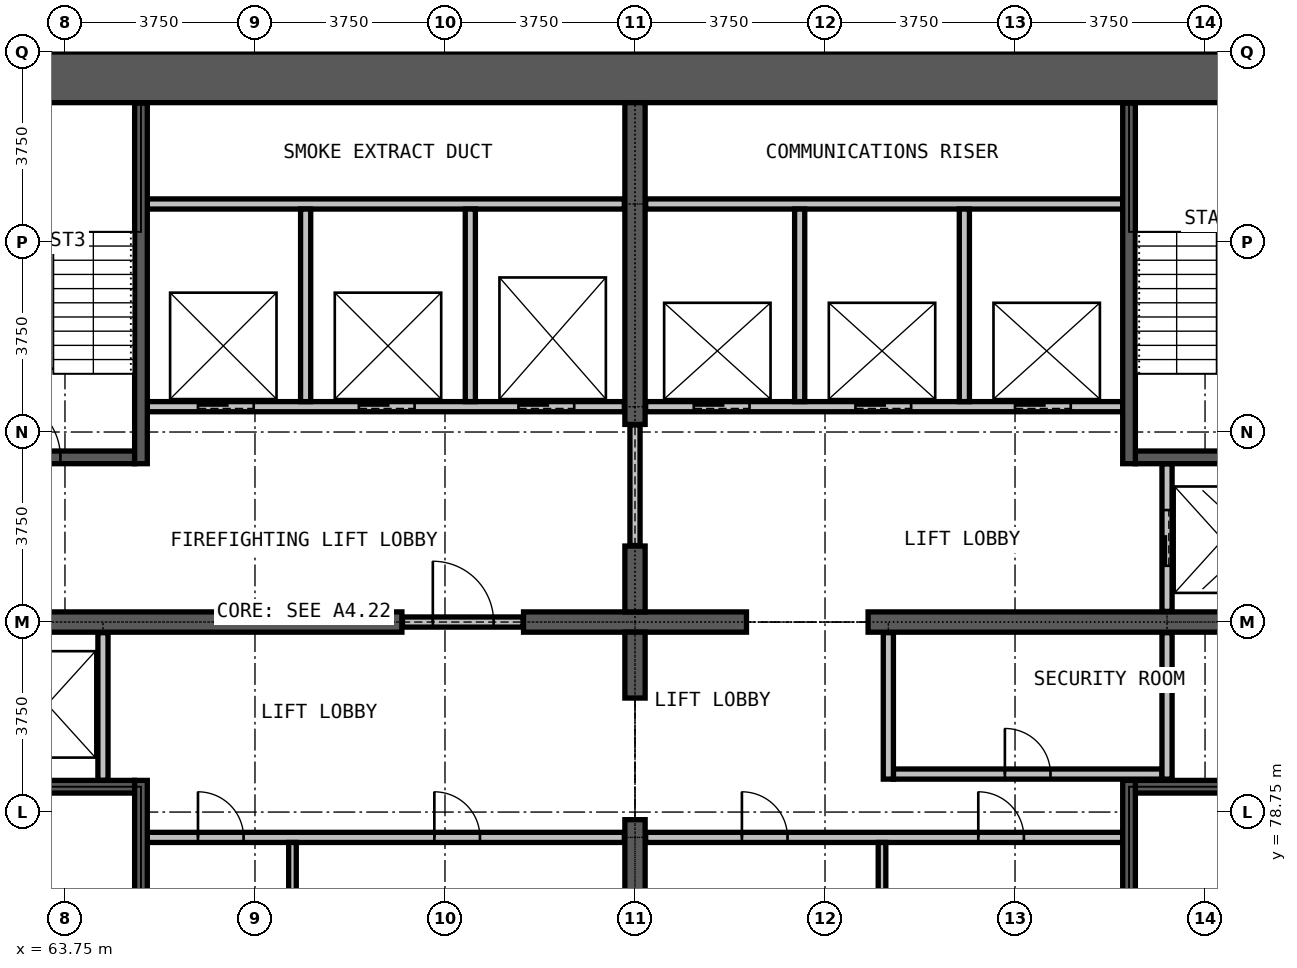
"""IFC4 building model, lengths in metres.
Left out: names, types, materials, properties, quantities, classifications, styles, units other than length and angle.
Written with IfcOpenShell. Run it as: python <this file> out.ifc"""

import sys

from ifc_helpers import new_model, si_unit, direction, frame, frame_2d, origin, place, context, subcontext, project, spatial, rectangle, extrude, element, fill, save


model = new_model("IFC4")
c1 = context("Model", 3, precision=1e-05, world=origin(), true_north=direction((0.0, 1.0)))
c2 = subcontext(c1, "Body", "Model", "MODEL_VIEW")
j1 = project(units=[si_unit("LENGTHUNIT", "METRE"), si_unit("PLANEANGLEUNIT", "RADIAN")], contexts=[c1])
p1 = place(None, origin())
s1 = spatial("IfcSite", under=j1, at=p1, CompositionType="ELEMENT")
p2 = place(p1, origin())
s2 = spatial("IfcBuilding", under=s1, at=p2, CompositionType="ELEMENT")
p3 = place(p2, frame((0.0, 0.0, 235.5)))
s3 = spatial("IfcBuildingStorey", under=s2, at=p3, CompositionType="ELEMENT", Elevation=235.5)
p4 = place(p3, frame((90.0, 93.25, 0.0), z_axis=(0.0, 0.0, 1.0), x_axis=(-1.0, 0.0, 0.0)))
e1 = element("IfcWall", 1, at=p4, inside=s3, PredefinedType="SHEAR", context=c2, shape_type="SweptSolid", body=[
    extrude(rectangle(XDim=30.0, YDim=1.0, at=frame_2d((15.0, 0.0))), origin(), (0.0, 0.0, 1.0), 3.6),
])
p5 = place(p3, frame((61.0, 82.5, 0.0), z_axis=(0.0, 0.0, 1.0), x_axis=(1.0, 0.0, 0.0)))
e2 = element("IfcWall", 2, at=p5, inside=s3, PredefinedType="SHEAR", context=c2, shape_type="SweptSolid", body=[
    extrude(rectangle(XDim=9.4, YDim=0.4, at=frame_2d((4.7, 0.0))), origin(), (0.0, 0.0, 1.0), 3.6),
])
p6 = place(p3, frame((72.8, 82.5, 0.0), z_axis=(0.0, 0.0, 1.0), x_axis=(1.0, 0.0, 0.0)))
e3 = element("IfcWall", 3, at=p6, inside=s3, PredefinedType="SHEAR", context=c2, shape_type="SweptSolid", body=[
    extrude(rectangle(XDim=4.4, YDim=0.4, at=frame_2d((2.2, 0.0))), origin(), (0.0, 0.0, 1.0), 3.6),
])
p7 = place(p3, frame((79.6, 82.5, 0.0), z_axis=(0.0, 0.0, 1.0), x_axis=(1.0, 0.0, 0.0)))
e4 = element("IfcWall", 4, at=p7, inside=s3, PredefinedType="SHEAR", context=c2, shape_type="SweptSolid", body=[
    extrude(rectangle(XDim=9.4, YDim=0.4, at=frame_2d((4.7, 0.0))), origin(), (0.0, 0.0, 1.0), 3.6),
])
p8 = place(p3, frame((75.0, 72.25, 0.0), z_axis=(0.0, 0.0, 1.0), x_axis=(0.0, 1.0, 0.0)))
e5 = element("IfcWall", 5, at=p8, inside=s3, PredefinedType="SHEAR", context=c2, shape_type="SweptSolid", body=[
    extrude(rectangle(XDim=6.35, YDim=0.4, at=frame_2d((3.175, 0.0))), origin(), (0.0, 0.0, 1.0), 3.6),
])
for number, where, z_axis, x_axis in (
    (6, (75.0, 81.0, 0.0), (0.0, 0.0, 1.0), (0.0, 1.0, 0.0)),
    (7, (75.0, 82.7, 0.0), (0.0, 0.0, 1.0), (0.0, 1.0, 0.0)),
):
    element("IfcWall", number, at=place(p3, frame(where, z_axis=z_axis, x_axis=x_axis)), inside=s3, PredefinedType="SHEAR", context=c2, shape_type="SweptSolid", body=[
        extrude(rectangle(XDim=1.3, YDim=0.4, at=frame_2d((0.65, 0.0))), origin(), (0.0, 0.0, 1.0), 3.6),
    ])
p9 = place(p3, frame((75.0, 86.4, 0.0), z_axis=(0.0, 0.0, 1.0), x_axis=(0.0, 1.0, 0.0)))
e8 = element("IfcWall", 8, at=p9, inside=s3, PredefinedType="SHEAR", context=c2, shape_type="SweptSolid", body=[
    extrude(rectangle(XDim=6.35, YDim=0.4, at=frame_2d((3.175, 0.0))), origin(), (0.0, 0.0, 1.0), 3.6),
])
p10 = place(p3, frame((65.375, 78.25, 0.0), z_axis=(0.0, 0.0, 1.0), x_axis=(1.0, 0.0, 0.0)))
e9 = element("IfcWall", 9, at=p10, inside=s3, PredefinedType="PARTITIONING", context=c2, shape_type="SweptSolid", body=[
    extrude(rectangle(XDim=9.415, YDim=0.2, at=frame_2d((4.708, 0.0))), origin(), (0.0, 0.0, 1.0), 3.3),
])
p11 = place(p10, frame((1.0, 0.0, 0.0)))
e10 = element("IfcOpeningElement", 10, at=p11, cuts=e9, PredefinedType="OPENING", context=c2, shape_type="SweptSolid", body=[
    extrude(rectangle(XDim=0.9, YDim=2.2, at=frame_2d((0.45, 1.1))), frame((0.0, 0.11, 0.0), z_axis=(0.0, -1.0, 0.0), x_axis=(1.0, 0.0, 0.0)), (0.0, 0.0, 1.0), 0.22),
])
p12 = place(p10, frame((5.665, 0.0, 0.0)))
e11 = element("IfcOpeningElement", 11, at=p12, cuts=e9, PredefinedType="OPENING", context=c2, shape_type="SweptSolid", body=[
    extrude(rectangle(XDim=0.9, YDim=2.2, at=frame_2d((0.45, 1.1))), frame((0.0, 0.11, 0.0), z_axis=(0.0, -1.0, 0.0), x_axis=(1.0, 0.0, 0.0)), (0.0, 0.0, 1.0), 0.22),
])
p13 = place(p3, frame((75.21, 78.25, 0.0), z_axis=(0.0, 0.0, 1.0), x_axis=(1.0, 0.0, 0.0)))
e12 = element("IfcWall", 12, at=p13, inside=s3, PredefinedType="PARTITIONING", context=c2, shape_type="SweptSolid", body=[
    extrude(rectangle(XDim=9.415, YDim=0.2, at=frame_2d((4.708, 0.0))), origin(), (0.0, 0.0, 1.0), 3.3),
])
p14 = place(p13, frame((1.9, 0.0, 0.0)))
e13 = element("IfcOpeningElement", 13, at=p14, cuts=e12, PredefinedType="OPENING", context=c2, shape_type="SweptSolid", body=[
    extrude(rectangle(XDim=0.9, YDim=2.2, at=frame_2d((0.45, 1.1))), frame((0.0, 0.11, 0.0), z_axis=(0.0, -1.0, 0.0), x_axis=(1.0, 0.0, 0.0)), (0.0, 0.0, 1.0), 0.22),
])
p15 = place(p13, frame((6.565, 0.0, 0.0)))
e14 = element("IfcOpeningElement", 14, at=p15, cuts=e12, PredefinedType="OPENING", context=c2, shape_type="SweptSolid", body=[
    extrude(rectangle(XDim=0.9, YDim=2.2, at=frame_2d((0.45, 1.1))), frame((0.0, 0.11, 0.0), z_axis=(0.0, -1.0, 0.0), x_axis=(1.0, 0.0, 0.0)), (0.0, 0.0, 1.0), 0.22),
])
p16 = place(p3, frame((80.1, 79.5, 0.0), z_axis=(0.0, 0.0, 1.0), x_axis=(1.0, 0.0, 0.0)))
e15 = element("IfcWall", 15, at=p16, inside=s3, PredefinedType="PARTITIONING", context=c2, shape_type="SweptSolid", body=[
    extrude(rectangle(XDim=5.3, YDim=0.2, at=frame_2d((2.65, 0.0))), origin(), (0.0, 0.0, 1.0), 3.3),
])
p17 = place(p16, frame((2.2, 0.0, 0.0)))
e16 = element("IfcOpeningElement", 16, at=p17, cuts=e15, PredefinedType="OPENING", context=c2, shape_type="SweptSolid", body=[
    extrude(rectangle(XDim=0.9, YDim=2.2, at=frame_2d((0.45, 1.1))), frame((0.0, 0.11, 0.0), z_axis=(0.0, -1.0, 0.0), x_axis=(1.0, 0.0, 0.0)), (0.0, 0.0, 1.0), 0.22),
])
p18 = place(p3, frame((70.41, 82.5, 0.0), z_axis=(0.0, 0.0, 1.0), x_axis=(1.0, 0.0, 0.0)))
e17 = element("IfcWall", 17, at=p18, inside=s3, PredefinedType="PARTITIONING", context=c2, shape_type="SweptSolid", body=[
    extrude(rectangle(XDim=2.38, YDim=0.2, at=frame_2d((1.19, 0.0))), origin(), (0.0, 0.0, 1.0), 2.4),
])
p19 = place(p18, frame((0.6, 0.0, 0.0)))
e18 = element("IfcOpeningElement", 18, at=p19, cuts=e17, PredefinedType="OPENING", context=c2, shape_type="SweptSolid", body=[
    extrude(rectangle(XDim=1.2, YDim=2.2, at=frame_2d((0.6, 1.1))), frame((0.0, 0.11, 0.0), z_axis=(0.0, -1.0, 0.0), x_axis=(1.0, 0.0, 0.0)), (0.0, 0.0, 1.0), 0.22),
])
p20 = place(p3, frame((75.0, 84.01, 0.0), z_axis=(0.0, 0.0, 1.0), x_axis=(0.0, 1.0, 0.0)))
e19 = element("IfcWall", 19, at=p20, inside=s3, PredefinedType="PARTITIONING", context=c2, shape_type="SweptSolid", body=[
    extrude(rectangle(XDim=2.38, YDim=0.2, at=frame_2d((1.19, 0.0))), origin(), (0.0, 0.0, 1.0), 2.4),
])
for number, where, z_axis, x_axis in (
    (20, (80.0, 79.4, 0.0), (0.0, 0.0, 1.0), (0.0, 1.0, 0.0)),
    (21, (85.5, 79.4, 0.0), (0.0, 0.0, 1.0), (0.0, 1.0, 0.0)),
):
    element("IfcWall", number, at=place(p3, frame(where, z_axis=z_axis, x_axis=x_axis)), inside=s3, PredefinedType="PARTITIONING", context=c2, shape_type="SweptSolid", body=[
        extrude(rectangle(XDim=2.89, YDim=0.2, at=frame_2d((1.445, 0.0))), origin(), (0.0, 0.0, 1.0), 3.3),
    ])
for number, where, z_axis, x_axis in (
    (22, (68.24, 74.35, 0.0), (0.0, 0.0, 1.0), (0.0, 1.0, 0.0)),
    (23, (79.875, 74.35, 0.0), (0.0, 0.0, 1.0), (0.0, 1.0, 0.0)),
):
    element("IfcWall", number, at=place(p3, frame(where, z_axis=z_axis, x_axis=x_axis)), inside=s3, PredefinedType="PARTITIONING", context=c2, shape_type="SweptSolid", body=[
        extrude(rectangle(XDim=3.8, YDim=0.15, at=frame_2d((1.9, 0.0))), origin(), (0.0, 0.0, 1.0), 3.3),
    ])
p21 = place(p3, frame((65.375, 86.75, 0.0), z_axis=(0.0, 0.0, 1.0), x_axis=(1.0, 0.0, 0.0)))
e24 = element("IfcWall", 24, at=p21, inside=s3, PredefinedType="PARTITIONING", context=c2, shape_type="SweptSolid", body=[
    extrude(rectangle(XDim=9.415, YDim=0.2, at=frame_2d((4.708, 0.0))), origin(), (0.0, 0.0, 1.0), 3.3),
])
p22 = place(p21, frame((1.0, 0.0, 0.0)))
e25 = element("IfcOpeningElement", 25, at=p22, cuts=e24, PredefinedType="OPENING", context=c2, shape_type="SweptSolid", body=[
    extrude(rectangle(XDim=1.1, YDim=2.2, at=frame_2d((0.55, 1.1))), frame((0.0, 0.11, 0.0), z_axis=(0.0, -1.0, 0.0), x_axis=(1.0, 0.0, 0.0)), (0.0, 0.0, 1.0), 0.22),
])
p23 = place(p21, frame((4.175, 0.0, 0.0)))
e26 = element("IfcOpeningElement", 26, at=p23, cuts=e24, PredefinedType="OPENING", context=c2, shape_type="SweptSolid", body=[
    extrude(rectangle(XDim=1.1, YDim=2.2, at=frame_2d((0.55, 1.1))), frame((0.0, 0.11, 0.0), z_axis=(0.0, -1.0, 0.0), x_axis=(1.0, 0.0, 0.0)), (0.0, 0.0, 1.0), 0.22),
])
p24 = place(p21, frame((7.325, 0.0, 0.0)))
e27 = element("IfcOpeningElement", 27, at=p24, cuts=e24, PredefinedType="OPENING", context=c2, shape_type="SweptSolid", body=[
    extrude(rectangle(XDim=1.1, YDim=2.2, at=frame_2d((0.55, 1.1))), frame((0.0, 0.11, 0.0), z_axis=(0.0, -1.0, 0.0), x_axis=(1.0, 0.0, 0.0)), (0.0, 0.0, 1.0), 0.22),
])
p25 = place(p3, frame((75.21, 86.75, 0.0), z_axis=(0.0, 0.0, 1.0), x_axis=(1.0, 0.0, 0.0)))
e28 = element("IfcWall", 28, at=p25, inside=s3, PredefinedType="PARTITIONING", context=c2, shape_type="SweptSolid", body=[
    extrude(rectangle(XDim=9.415, YDim=0.2, at=frame_2d((4.708, 0.0))), origin(), (0.0, 0.0, 1.0), 3.3),
])
p26 = place(p25, frame((0.95, 0.0, 0.0)))
e29 = element("IfcOpeningElement", 29, at=p26, cuts=e28, PredefinedType="OPENING", context=c2, shape_type="SweptSolid", body=[
    extrude(rectangle(XDim=1.1, YDim=2.2, at=frame_2d((0.55, 1.1))), frame((0.0, 0.11, 0.0), z_axis=(0.0, -1.0, 0.0), x_axis=(1.0, 0.0, 0.0)), (0.0, 0.0, 1.0), 0.22),
])
p27 = place(p25, frame((4.14, 0.0, 0.0)))
e30 = element("IfcOpeningElement", 30, at=p27, cuts=e28, PredefinedType="OPENING", context=c2, shape_type="SweptSolid", body=[
    extrude(rectangle(XDim=1.1, YDim=2.2, at=frame_2d((0.55, 1.1))), frame((0.0, 0.11, 0.0), z_axis=(0.0, -1.0, 0.0), x_axis=(1.0, 0.0, 0.0)), (0.0, 0.0, 1.0), 0.22),
])
p28 = place(p25, frame((7.29, 0.0, 0.0)))
e31 = element("IfcOpeningElement", 31, at=p28, cuts=e28, PredefinedType="OPENING", context=c2, shape_type="SweptSolid", body=[
    extrude(rectangle(XDim=1.1, YDim=2.2, at=frame_2d((0.55, 1.1))), frame((0.0, 0.11, 0.0), z_axis=(0.0, -1.0, 0.0), x_axis=(1.0, 0.0, 0.0)), (0.0, 0.0, 1.0), 0.22),
])
for number, where, z_axis, x_axis in (
    (32, (65.375, 90.75, 0.0), (0.0, 0.0, 1.0), (1.0, 0.0, 0.0)),
    (33, (75.21, 90.75, 0.0), (0.0, 0.0, 1.0), (1.0, 0.0, 0.0)),
):
    element("IfcWall", number, at=place(p3, frame(where, z_axis=z_axis, x_axis=x_axis)), inside=s3, PredefinedType="PARTITIONING", context=c2, shape_type="SweptSolid", body=[
        extrude(rectangle(XDim=9.415, YDim=0.2, at=frame_2d((4.708, 0.0))), origin(), (0.0, 0.0, 1.0), 3.3),
    ])
p29 = place(p3, frame((64.5, 79.375, 0.0), z_axis=(0.0, 0.0, 1.0), x_axis=(0.0, 1.0, 0.0)))
e34 = element("IfcWall", 34, at=p29, inside=s3, PredefinedType="PARTITIONING", context=c2, shape_type="SweptSolid", body=[
    extrude(rectangle(XDim=2.915, YDim=0.2, at=frame_2d((1.458, 0.0))), origin(), (0.0, 0.0, 1.0), 3.3),
])
for number, where, z_axis, x_axis in (
    (35, (68.5, 86.85, 0.0), (0.0, 0.0, 1.0), (0.0, 1.0, 0.0)),
    (36, (71.75, 86.85, 0.0), (0.0, 0.0, 1.0), (0.0, 1.0, 0.0)),
    (37, (78.25, 86.85, 0.0), (0.0, 0.0, 1.0), (0.0, 1.0, 0.0)),
    (38, (81.5, 86.85, 0.0), (0.0, 0.0, 1.0), (0.0, 1.0, 0.0)),
):
    element("IfcWall", number, at=place(p3, frame(where, z_axis=z_axis, x_axis=x_axis)), inside=s3, PredefinedType="PARTITIONING", context=c2, shape_type="SweptSolid", body=[
        extrude(rectangle(XDim=3.8, YDim=0.2, at=frame_2d((1.9, 0.0))), origin(), (0.0, 0.0, 1.0), 3.3),
    ])
p30 = place(p3, frame((85.5, 82.71, 0.0), z_axis=(0.0, 0.0, 1.0), x_axis=(0.0, 1.0, 0.0)))
e39 = element("IfcWall", 39, at=p30, inside=s3, PredefinedType="PARTITIONING", context=c2, shape_type="SweptSolid", body=[
    extrude(rectangle(XDim=2.915, YDim=0.2, at=frame_2d((1.458, 0.0))), origin(), (0.0, 0.0, 1.0), 3.3),
])
p31 = place(p30, frame((0.9, 0.0, 0.0)))
e40 = element("IfcOpeningElement", 40, at=p31, cuts=e39, PredefinedType="OPENING", context=c2, shape_type="SweptSolid", body=[
    extrude(rectangle(XDim=1.1, YDim=2.2, at=frame_2d((0.55, 1.1))), frame((0.0, 0.11, 0.0), z_axis=(0.0, -1.0, 0.0), x_axis=(1.0, 0.0, 0.0)), (0.0, 0.0, 1.0), 0.22),
])
for number, where, z_axis, x_axis in (
    (41, (61.01, 79.25, 0.0), (0.0, 0.0, 1.0), (1.0, 0.0, 0.0)),
    (42, (84.875, 79.25, 0.0), (0.0, 0.0, 1.0), (1.0, 0.0, 0.0)),
):
    element("IfcWall", number, at=place(p3, frame(where, z_axis=z_axis, x_axis=x_axis)), inside=s3, PredefinedType="PARTITIONING", context=c2, shape_type="SweptSolid", body=[
        extrude(rectangle(XDim=4.115, YDim=0.25, at=frame_2d((2.058, 0.0))), origin(), (0.0, 0.0, 1.0), 3.3),
    ])
p32 = place(p3, frame((61.01, 85.75, 0.0), z_axis=(0.0, 0.0, 1.0), x_axis=(1.0, 0.0, 0.0)))
e43 = element("IfcWall", 43, at=p32, inside=s3, PredefinedType="PARTITIONING", context=c2, shape_type="SweptSolid", body=[
    extrude(rectangle(XDim=4.115, YDim=0.25, at=frame_2d((2.058, 0.0))), origin(), (0.0, 0.0, 1.0), 3.3),
])
p33 = place(p32, frame((1.45, 0.0, 0.0)))
e44 = element("IfcOpeningElement", 44, at=p33, cuts=e43, PredefinedType="OPENING", context=c2, shape_type="SweptSolid", body=[
    extrude(rectangle(XDim=1.2, YDim=2.2, at=frame_2d((0.6, 1.1))), frame((0.0, 0.135, 0.0), z_axis=(0.0, -1.0, 0.0), x_axis=(1.0, 0.0, 0.0)), (0.0, 0.0, 1.0), 0.27),
])
p34 = place(p3, frame((84.875, 85.75, 0.0), z_axis=(0.0, 0.0, 1.0), x_axis=(1.0, 0.0, 0.0)))
e45 = element("IfcWall", 45, at=p34, inside=s3, PredefinedType="PARTITIONING", context=c2, shape_type="SweptSolid", body=[
    extrude(rectangle(XDim=4.115, YDim=0.25, at=frame_2d((2.058, 0.0))), origin(), (0.0, 0.0, 1.0), 3.3),
])
for number, where, z_axis, x_axis in (
    (46, (65.25, 72.26, 0.0), (0.0, 0.0, 1.0), (0.0, 1.0, 0.0)),
    (47, (65.25, 85.625, 0.0), (0.0, 0.0, 1.0), (0.0, 1.0, 0.0)),
    (48, (84.75, 72.26, 0.0), (0.0, 0.0, 1.0), (0.0, 1.0, 0.0)),
    (49, (84.75, 85.625, 0.0), (0.0, 0.0, 1.0), (0.0, 1.0, 0.0)),
):
    element("IfcWall", number, at=place(p3, frame(where, z_axis=z_axis, x_axis=x_axis)), inside=s3, PredefinedType="PARTITIONING", context=c2, shape_type="SweptSolid", body=[
        extrude(rectangle(XDim=7.115, YDim=0.25, at=frame_2d((3.558, 0.0))), origin(), (0.0, 0.0, 1.0), 3.3),
    ])
p35 = place(p26, origin())
e50 = element("IfcDoor", 50, at=p35, inside=s3, OperationType="DOUBLE_DOOR_SLIDING", PredefinedType="DOOR", context=c2, shape_type="SweptSolid", body=[
    extrude(rectangle(XDim=1.1, YDim=2.2, at=frame_2d((0.55, 1.1))), frame((0.0, 0.025, 0.0), z_axis=(0.0, -1.0, 0.0), x_axis=(1.0, 0.0, 0.0)), (0.0, 0.0, 1.0), 0.05),
])
fill(e29, e50)
p36 = place(p27, origin())
e51 = element("IfcDoor", 51, at=p36, inside=s3, OperationType="DOUBLE_DOOR_SLIDING", PredefinedType="DOOR", context=c2, shape_type="SweptSolid", body=[
    extrude(rectangle(XDim=1.1, YDim=2.2, at=frame_2d((0.55, 1.1))), frame((0.0, 0.025, 0.0), z_axis=(0.0, -1.0, 0.0), x_axis=(1.0, 0.0, 0.0)), (0.0, 0.0, 1.0), 0.05),
])
fill(e30, e51)
p37 = place(p28, origin())
e52 = element("IfcDoor", 52, at=p37, inside=s3, OperationType="DOUBLE_DOOR_SLIDING", PredefinedType="DOOR", context=c2, shape_type="SweptSolid", body=[
    extrude(rectangle(XDim=1.1, YDim=2.2, at=frame_2d((0.55, 1.1))), frame((0.0, 0.025, 0.0), z_axis=(0.0, -1.0, 0.0), x_axis=(1.0, 0.0, 0.0)), (0.0, 0.0, 1.0), 0.05),
])
fill(e31, e52)
p38 = place(p22, origin())
e53 = element("IfcDoor", 53, at=p38, inside=s3, OperationType="DOUBLE_DOOR_SLIDING", PredefinedType="DOOR", context=c2, shape_type="SweptSolid", body=[
    extrude(rectangle(XDim=1.1, YDim=2.2, at=frame_2d((0.55, 1.1))), frame((0.0, 0.025, 0.0), z_axis=(0.0, -1.0, 0.0), x_axis=(1.0, 0.0, 0.0)), (0.0, 0.0, 1.0), 0.05),
])
fill(e25, e53)
p39 = place(p23, origin())
e54 = element("IfcDoor", 54, at=p39, inside=s3, OperationType="DOUBLE_DOOR_SLIDING", PredefinedType="DOOR", context=c2, shape_type="SweptSolid", body=[
    extrude(rectangle(XDim=1.1, YDim=2.2, at=frame_2d((0.55, 1.1))), frame((0.0, 0.025, 0.0), z_axis=(0.0, -1.0, 0.0), x_axis=(1.0, 0.0, 0.0)), (0.0, 0.0, 1.0), 0.05),
])
fill(e26, e54)
p40 = place(p24, origin())
e55 = element("IfcDoor", 55, at=p40, inside=s3, OperationType="DOUBLE_DOOR_SLIDING", PredefinedType="DOOR", context=c2, shape_type="SweptSolid", body=[
    extrude(rectangle(XDim=1.1, YDim=2.2, at=frame_2d((0.55, 1.1))), frame((0.0, 0.025, 0.0), z_axis=(0.0, -1.0, 0.0), x_axis=(1.0, 0.0, 0.0)), (0.0, 0.0, 1.0), 0.05),
])
fill(e27, e55)
p41 = place(p31, origin())
e56 = element("IfcDoor", 56, at=p41, inside=s3, OperationType="DOUBLE_DOOR_SLIDING", PredefinedType="DOOR", context=c2, shape_type="SweptSolid", body=[
    extrude(rectangle(XDim=1.1, YDim=2.2, at=frame_2d((0.55, 1.1))), frame((0.0, 0.025, 0.0), z_axis=(0.0, -1.0, 0.0), x_axis=(1.0, 0.0, 0.0)), (0.0, 0.0, 1.0), 0.05),
])
fill(e40, e56)
p42 = place(p19, origin())
e57 = element("IfcDoor", 57, at=p42, inside=s3, OperationType="SINGLE_SWING_RIGHT", PredefinedType="DOOR", context=c2, shape_type="SweptSolid", body=[
    extrude(rectangle(XDim=1.2, YDim=2.2, at=frame_2d((0.6, 1.1))), frame((0.0, 0.025, 0.0), z_axis=(0.0, -1.0, 0.0), x_axis=(1.0, 0.0, 0.0)), (0.0, 0.0, 1.0), 0.05),
])
fill(e18, e57)
p43 = place(p33, origin())
e58 = element("IfcDoor", 58, at=p43, inside=s3, OperationType="SINGLE_SWING_LEFT", PredefinedType="DOOR", context=c2, shape_type="SweptSolid", body=[
    extrude(rectangle(XDim=1.2, YDim=2.2, at=frame_2d((0.6, 1.1))), frame((0.0, 0.025, 0.0), z_axis=(0.0, -1.0, 0.0), x_axis=(1.0, 0.0, 0.0)), (0.0, 0.0, 1.0), 0.05),
])
fill(e44, e58)
p44 = place(p17, origin())
e59 = element("IfcDoor", 59, at=p44, inside=s3, OperationType="SINGLE_SWING_LEFT", PredefinedType="DOOR", context=c2, shape_type="SweptSolid", body=[
    extrude(rectangle(XDim=0.9, YDim=2.2, at=frame_2d((0.45, 1.1))), frame((0.0, 0.025, 0.0), z_axis=(0.0, -1.0, 0.0), x_axis=(1.0, 0.0, 0.0)), (0.0, 0.0, 1.0), 0.05),
])
fill(e16, e59)
p45 = place(p11, origin())
e60 = element("IfcDoor", 60, at=p45, inside=s3, OperationType="SINGLE_SWING_LEFT", PredefinedType="DOOR", context=c2, shape_type="SweptSolid", body=[
    extrude(rectangle(XDim=0.9, YDim=2.2, at=frame_2d((0.45, 1.1))), frame((0.0, 0.025, 0.0), z_axis=(0.0, -1.0, 0.0), x_axis=(1.0, 0.0, 0.0)), (0.0, 0.0, 1.0), 0.05),
])
fill(e10, e60)
p46 = place(p12, origin())
e61 = element("IfcDoor", 61, at=p46, inside=s3, OperationType="SINGLE_SWING_LEFT", PredefinedType="DOOR", context=c2, shape_type="SweptSolid", body=[
    extrude(rectangle(XDim=0.9, YDim=2.2, at=frame_2d((0.45, 1.1))), frame((0.0, 0.025, 0.0), z_axis=(0.0, -1.0, 0.0), x_axis=(1.0, 0.0, 0.0)), (0.0, 0.0, 1.0), 0.05),
])
fill(e11, e61)
p47 = place(p14, origin())
e62 = element("IfcDoor", 62, at=p47, inside=s3, OperationType="SINGLE_SWING_RIGHT", PredefinedType="DOOR", context=c2, shape_type="SweptSolid", body=[
    extrude(rectangle(XDim=0.9, YDim=2.2, at=frame_2d((0.45, 1.1))), frame((0.0, 0.025, 0.0), z_axis=(0.0, -1.0, 0.0), x_axis=(1.0, 0.0, 0.0)), (0.0, 0.0, 1.0), 0.05),
])
fill(e13, e62)
p48 = place(p15, origin())
e63 = element("IfcDoor", 63, at=p48, inside=s3, OperationType="SINGLE_SWING_LEFT", PredefinedType="DOOR", context=c2, shape_type="SweptSolid", body=[
    extrude(rectangle(XDim=0.9, YDim=2.2, at=frame_2d((0.45, 1.1))), frame((0.0, 0.025, 0.0), z_axis=(0.0, -1.0, 0.0), x_axis=(1.0, 0.0, 0.0)), (0.0, 0.0, 1.0), 0.05),
])
fill(e14, e63)
save(model, sys.argv[1])
